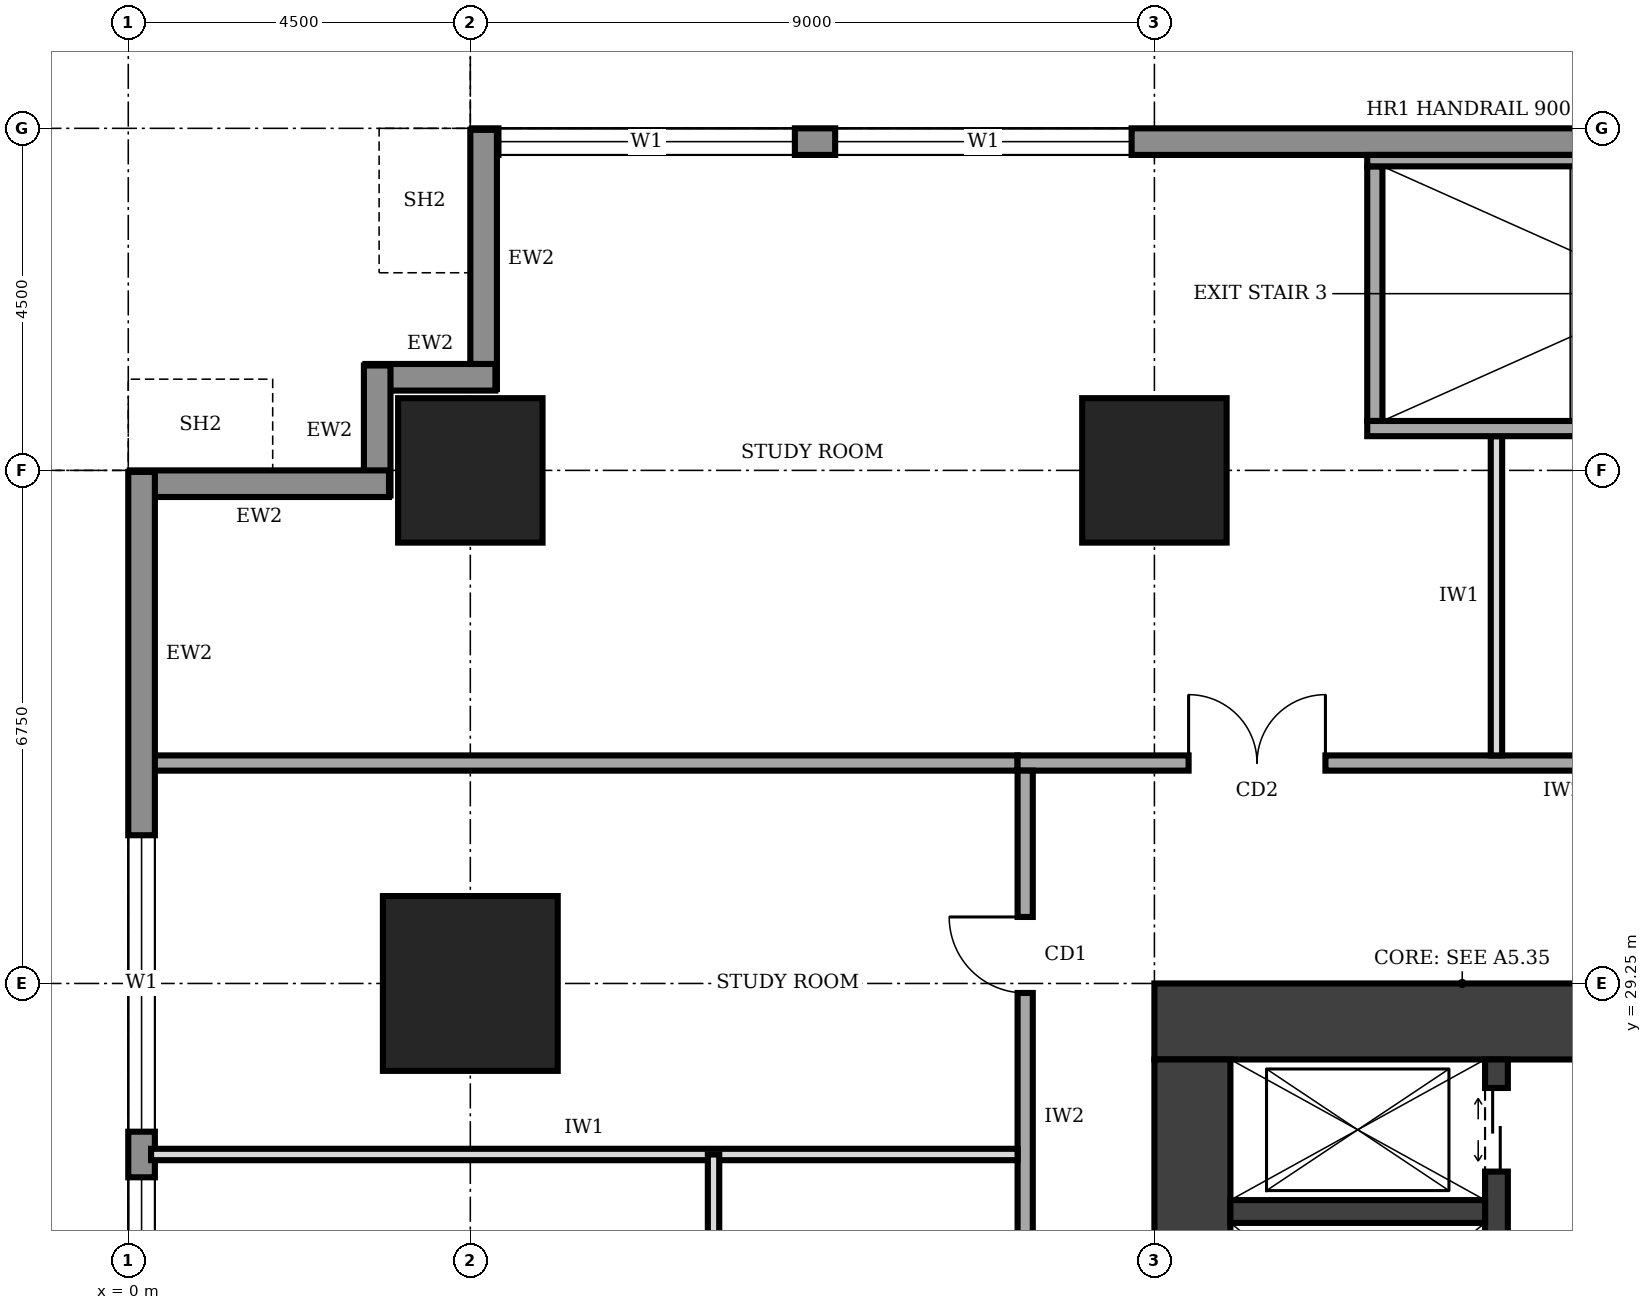
"""IFC4 building model, lengths in metres.
Left out: names, types, materials, properties, quantities, classifications, styles, units other than length and angle.
Written with IfcOpenShell. Run it as: python <this file> out.ifc"""

import sys

from ifc_helpers import new_model, si_unit, direction, frame, frame_2d, origin, origin_2d, place, context, subcontext, project, spatial, rectangle, extrude, element, fill, save


model = new_model("IFC4")
c1 = context("Model", 3, precision=1e-05, world=origin(), true_north=direction((0.0, 1.0)))
c2 = subcontext(c1, "Body", "Model", "MODEL_VIEW")
j1 = project(units=[si_unit("LENGTHUNIT", "METRE"), si_unit("PLANEANGLEUNIT", "RADIAN")], contexts=[c1])
p1 = place(None, origin())
s1 = spatial("IfcSite", under=j1, at=p1, CompositionType="ELEMENT")
p2 = place(p1, origin())
s2 = spatial("IfcBuilding", under=s1, at=p2, CompositionType="ELEMENT")
p3 = place(p2, frame((0.0, 0.0, 125.0)))
s3 = spatial("IfcBuildingStorey", under=s2, at=p3, CompositionType="ELEMENT", Elevation=125.0)
p4 = place(p3, frame((27.0, 28.75, 0.0), z_axis=(0.0, 0.0, 1.0), x_axis=(-1.0, 0.0, 0.0)))
e1 = element("IfcWall", 1, at=p4, inside=s3, PredefinedType="SHEAR", context=c2, shape_type="SweptSolid", body=[
    extrude(rectangle(XDim=13.5, YDim=1.0, at=frame_2d((6.75, 0.0))), origin(), (0.0, 0.0, 1.0), 4.0),
])
p5 = place(p4, frame((4.75, 0.0, 0.0)))
e2 = element("IfcOpeningElement", 2, at=p5, cuts=e1, PredefinedType="OPENING", context=c2, shape_type="SweptSolid", body=[
    extrude(rectangle(XDim=1.8, YDim=2.1, at=frame_2d((0.9, 1.05))), frame((0.0, 0.51, 0.0), z_axis=(0.0, -1.0, 0.0), x_axis=(1.0, 0.0, 0.0)), (0.0, 0.0, 1.0), 1.02),
])
p6 = place(p3, frame((14.0, 28.25, 0.0), z_axis=(0.0, 0.0, 1.0), x_axis=(0.0, -1.0, 0.0)))
e3 = element("IfcWall", 3, at=p6, inside=s3, PredefinedType="SHEAR", context=c2, shape_type="SweptSolid", body=[
    extrude(rectangle(XDim=16.0, YDim=1.0, at=frame_2d((8.0, 0.0))), origin(), (0.0, 0.0, 1.0), 4.0),
])
p7 = place(p3, frame((18.0, 12.25, 0.0), z_axis=(0.0, 0.0, 1.0), x_axis=(0.0, 1.0, 0.0)))
e4 = element("IfcWall", 4, at=p7, inside=s3, PredefinedType="SHEAR", context=c2, shape_type="SweptSolid", body=[
    extrude(rectangle(XDim=16.0, YDim=0.3, at=frame_2d((8.0, 0.0))), origin(), (0.0, 0.0, 1.0), 4.0),
])
p8 = place(p7, frame((0.4, 0.0, 0.0)))
e5 = element("IfcOpeningElement", 5, at=p8, cuts=e4, PredefinedType="OPENING", context=c2, shape_type="SweptSolid", body=[
    extrude(rectangle(XDim=1.0, YDim=2.1, at=frame_2d((0.5, 1.05))), frame((0.0, 0.16, 0.0), z_axis=(0.0, -1.0, 0.0), x_axis=(1.0, 0.0, 0.0)), (0.0, 0.0, 1.0), 0.32),
])
p9 = place(p7, frame((14.525, 0.0, 0.0)))
e6 = element("IfcOpeningElement", 6, at=p9, cuts=e4, PredefinedType="OPENING", context=c2, shape_type="SweptSolid", body=[
    extrude(rectangle(XDim=1.1, YDim=2.1, at=frame_2d((0.55, 1.05))), frame((0.0, 0.16, 0.0), z_axis=(0.0, -1.0, 0.0), x_axis=(1.0, 0.0, 0.0)), (0.0, 0.0, 1.0), 0.32),
])
p10 = place(p7, frame((9.0, 0.0, 0.0)))
e7 = element("IfcOpeningElement", 7, at=p10, cuts=e4, PredefinedType="OPENING", context=c2, shape_type="SweptSolid", body=[
    extrude(rectangle(XDim=1.0, YDim=2.1, at=frame_2d((0.5, 1.05))), frame((0.0, 0.16, 0.0), z_axis=(0.0, -1.0, 0.0), x_axis=(1.0, 0.0, 0.0)), (0.0, 0.0, 1.0), 0.32),
])
p11 = place(p7, frame((12.0, 0.0, 0.0)))
e8 = element("IfcOpeningElement", 8, at=p11, cuts=e4, PredefinedType="OPENING", context=c2, shape_type="SweptSolid", body=[
    extrude(rectangle(XDim=1.0, YDim=2.1, at=frame_2d((0.5, 1.05))), frame((0.0, 0.16, 0.0), z_axis=(0.0, -1.0, 0.0), x_axis=(1.0, 0.0, 0.0)), (0.0, 0.0, 1.0), 0.32),
])
p12 = place(p3, frame((14.5, 26.25, 0.0), z_axis=(0.0, 0.0, 1.0), x_axis=(1.0, 0.0, 0.0)))
e9 = element("IfcWall", 9, at=p12, inside=s3, PredefinedType="SHEAR", context=c2, shape_type="SweptSolid", body=[
    extrude(rectangle(XDim=3.35, YDim=0.3, at=frame_2d((1.675, 0.0))), origin(), (0.0, 0.0, 1.0), 4.0),
])
p13 = place(p3, frame((4.5, 29.25, 0.0), z_axis=(0.0, 0.0, 1.0), x_axis=(1.0, 0.0, 0.0)))
e10 = element("IfcColumn", 10, at=p13, inside=s3, PredefinedType="COLUMN", context=c2, shape_type="SweptSolid", body=[
    extrude(rectangle(XDim=2.3, YDim=2.3, at=origin_2d()), origin(), (0.0, 0.0, 1.0), 4.0),
])
for number, where, z_axis, x_axis in (
    (11, (4.5, 36.0, 0.0), (0.0, 0.0, 1.0), (1.0, 0.0, 0.0)),
    (12, (13.5, 36.0, 0.0), (0.0, 0.0, 1.0), (1.0, 0.0, 0.0)),
):
    element("IfcColumn", number, at=place(p3, frame(where, z_axis=z_axis, x_axis=x_axis)), inside=s3, PredefinedType="COLUMN", context=c2, shape_type="SweptSolid", body=[
        extrude(rectangle(XDim=1.9, YDim=1.9, at=origin_2d()), origin(), (0.0, 0.0, 1.0), 4.0),
    ])
p14 = place(p3, frame((35.98, 40.325, 0.0), z_axis=(0.0, 0.0, 1.0), x_axis=(-1.0, 0.0, 0.0)))
e13 = element("IfcWall", 13, at=p14, inside=s3, PredefinedType="STANDARD", context=c2, shape_type="SweptSolid", body=[
    extrude(rectangle(XDim=31.46, YDim=0.35, at=frame_2d((15.73, 0.0))), origin(), (0.0, 0.0, 1.0), 3.75),
])
p15 = place(p14, frame((27.21, 0.0, 0.9)))
e14 = element("IfcOpeningElement", 14, at=p15, cuts=e13, PredefinedType="OPENING", context=c2, shape_type="SweptSolid", body=[
    extrude(rectangle(XDim=3.9, YDim=2.2, at=frame_2d((1.95, 1.1))), frame((0.0, 0.185, 0.0), z_axis=(0.0, -1.0, 0.0), x_axis=(1.0, 0.0, 0.0)), (0.0, 0.0, 1.0), 0.37),
])
p16 = place(p14, frame((22.78, 0.0, 0.9)))
e15 = element("IfcOpeningElement", 15, at=p16, cuts=e13, PredefinedType="OPENING", context=c2, shape_type="SweptSolid", body=[
    extrude(rectangle(XDim=3.9, YDim=2.2, at=frame_2d((1.95, 1.1))), frame((0.0, 0.185, 0.0), z_axis=(0.0, -1.0, 0.0), x_axis=(1.0, 0.0, 0.0)), (0.0, 0.0, 1.0), 0.37),
])
p17 = place(p14, frame((4.78, 0.0, 0.9)))
e16 = element("IfcOpeningElement", 16, at=p17, cuts=e13, PredefinedType="OPENING", context=c2, shape_type="SweptSolid", body=[
    extrude(rectangle(XDim=3.9, YDim=2.2, at=frame_2d((1.95, 1.1))), frame((0.0, 0.185, 0.0), z_axis=(0.0, -1.0, 0.0), x_axis=(1.0, 0.0, 0.0)), (0.0, 0.0, 1.0), 0.37),
])
p18 = place(p3, frame((4.675, 40.48, 0.0), z_axis=(0.0, 0.0, 1.0), x_axis=(0.0, -1.0, 0.0)))
e17 = element("IfcWall", 17, at=p18, inside=s3, PredefinedType="STANDARD", context=c2, shape_type="SweptSolid", body=[
    extrude(rectangle(XDim=3.41, YDim=0.35, at=frame_2d((1.705, 0.0))), origin(), (0.0, 0.0, 1.0), 2.85),
])
for number, where, z_axis, x_axis in (
    (18, (4.83, 37.225, 0.0), (0.0, 0.0, 1.0), (-1.0, 0.0, 0.0)),
    (19, (3.275, 37.38, 0.0), (0.0, 0.0, 1.0), (0.0, -1.0, 0.0)),
):
    element("IfcWall", number, at=place(p3, frame(where, z_axis=z_axis, x_axis=x_axis)), inside=s3, PredefinedType="STANDARD", context=c2, shape_type="SweptSolid", body=[
        extrude(rectangle(XDim=1.71, YDim=0.35, at=frame_2d((0.855, 0.0))), origin(), (0.0, 0.0, 1.0), 3.75),
    ])
p19 = place(p3, frame((3.43, 35.825, 0.0), z_axis=(0.0, 0.0, 1.0), x_axis=(-1.0, 0.0, 0.0)))
e20 = element("IfcWall", 20, at=p19, inside=s3, PredefinedType="STANDARD", context=c2, shape_type="SweptSolid", body=[
    extrude(rectangle(XDim=3.41, YDim=0.35, at=frame_2d((1.705, 0.0))), origin(), (0.0, 0.0, 1.0), 2.85),
])
p20 = place(p3, frame((0.175, 35.98, 0.0), z_axis=(0.0, 0.0, 1.0), x_axis=(0.0, -1.0, 0.0)))
e21 = element("IfcWall", 21, at=p20, inside=s3, PredefinedType="STANDARD", context=c2, shape_type="SweptSolid", body=[
    extrude(rectangle(XDim=31.46, YDim=0.35, at=frame_2d((15.73, 0.0))), origin(), (0.0, 0.0, 1.0), 3.75),
])
p21 = place(p20, frame((27.21, 0.0, 0.9)))
e22 = element("IfcOpeningElement", 22, at=p21, cuts=e21, PredefinedType="OPENING", context=c2, shape_type="SweptSolid", body=[
    extrude(rectangle(XDim=3.9, YDim=2.2, at=frame_2d((1.95, 1.1))), frame((0.0, 0.185, 0.0), z_axis=(0.0, -1.0, 0.0), x_axis=(1.0, 0.0, 0.0)), (0.0, 0.0, 1.0), 0.37),
])
p22 = place(p20, frame((22.78, 0.0, 0.9)))
e23 = element("IfcOpeningElement", 23, at=p22, cuts=e21, PredefinedType="OPENING", context=c2, shape_type="SweptSolid", body=[
    extrude(rectangle(XDim=3.9, YDim=2.2, at=frame_2d((1.95, 1.1))), frame((0.0, 0.185, 0.0), z_axis=(0.0, -1.0, 0.0), x_axis=(1.0, 0.0, 0.0)), (0.0, 0.0, 1.0), 0.37),
])
p23 = place(p20, frame((18.28, 0.0, 0.9)))
e24 = element("IfcOpeningElement", 24, at=p23, cuts=e21, PredefinedType="OPENING", context=c2, shape_type="SweptSolid", body=[
    extrude(rectangle(XDim=3.9, YDim=2.2, at=frame_2d((1.95, 1.1))), frame((0.0, 0.185, 0.0), z_axis=(0.0, -1.0, 0.0), x_axis=(1.0, 0.0, 0.0)), (0.0, 0.0, 1.0), 0.37),
])
p24 = place(p20, frame((13.78, 0.0, 0.9)))
e25 = element("IfcOpeningElement", 25, at=p24, cuts=e21, PredefinedType="OPENING", context=c2, shape_type="SweptSolid", body=[
    extrude(rectangle(XDim=3.9, YDim=2.2, at=frame_2d((1.95, 1.1))), frame((0.0, 0.185, 0.0), z_axis=(0.0, -1.0, 0.0), x_axis=(1.0, 0.0, 0.0)), (0.0, 0.0, 1.0), 0.37),
])
p25 = place(p20, frame((9.28, 0.0, 0.9)))
e26 = element("IfcOpeningElement", 26, at=p25, cuts=e21, PredefinedType="OPENING", context=c2, shape_type="SweptSolid", body=[
    extrude(rectangle(XDim=3.9, YDim=2.2, at=frame_2d((1.95, 1.1))), frame((0.0, 0.185, 0.0), z_axis=(0.0, -1.0, 0.0), x_axis=(1.0, 0.0, 0.0)), (0.0, 0.0, 1.0), 0.37),
])
p26 = place(p20, frame((4.78, 0.0, 0.9)))
e27 = element("IfcOpeningElement", 27, at=p26, cuts=e21, PredefinedType="OPENING", context=c2, shape_type="SweptSolid", body=[
    extrude(rectangle(XDim=3.9, YDim=2.2, at=frame_2d((1.95, 1.1))), frame((0.0, 0.185, 0.0), z_axis=(0.0, -1.0, 0.0), x_axis=(1.0, 0.0, 0.0)), (0.0, 0.0, 1.0), 0.37),
])
p27 = place(p3, frame((29.35, 32.15, 0.0), z_axis=(0.0, 0.0, 1.0), x_axis=(-1.0, 0.0, 0.0)))
e28 = element("IfcWall", 28, at=p27, inside=s3, PredefinedType="SOLIDWALL", context=c2, shape_type="SweptSolid", body=[
    extrude(rectangle(XDim=17.65, YDim=0.2, at=frame_2d((8.825, 0.0))), origin(), (0.0, 0.0, 1.0), 3.75),
])
p28 = place(p27, frame((13.6, 0.0, 0.0)))
e29 = element("IfcOpeningElement", 29, at=p28, cuts=e28, PredefinedType="OPENING", context=c2, shape_type="SweptSolid", body=[
    extrude(rectangle(XDim=1.8, YDim=2.1, at=frame_2d((0.9, 1.05))), frame((0.0, 0.11, 0.0), z_axis=(0.0, -1.0, 0.0), x_axis=(1.0, 0.0, 0.0)), (0.0, 0.0, 1.0), 0.22),
])
p29 = place(p27, frame((6.35, 0.0, 0.0)))
e30 = element("IfcOpeningElement", 30, at=p29, cuts=e28, PredefinedType="OPENING", context=c2, shape_type="SweptSolid", body=[
    extrude(rectangle(XDim=1.0, YDim=2.1, at=frame_2d((0.5, 1.05))), frame((0.0, 0.11, 0.0), z_axis=(0.0, -1.0, 0.0), x_axis=(1.0, 0.0, 0.0)), (0.0, 0.0, 1.0), 0.22),
])
p30 = place(p27, frame((0.575, 0.0, 0.0)))
e31 = element("IfcOpeningElement", 31, at=p30, cuts=e28, PredefinedType="OPENING", context=c2, shape_type="SweptSolid", body=[
    extrude(rectangle(XDim=1.0, YDim=2.1, at=frame_2d((0.5, 1.05))), frame((0.0, 0.11, 0.0), z_axis=(0.0, -1.0, 0.0), x_axis=(1.0, 0.0, 0.0)), (0.0, 0.0, 1.0), 0.22),
])
p31 = place(p3, frame((11.8, 32.05, 0.0), z_axis=(0.0, 0.0, 1.0), x_axis=(0.0, -1.0, 0.0)))
e32 = element("IfcWall", 32, at=p31, inside=s3, PredefinedType="SOLIDWALL", context=c2, shape_type="SweptSolid", body=[
    extrude(rectangle(XDim=23.05, YDim=0.2, at=frame_2d((11.525, 0.0))), origin(), (0.0, 0.0, 1.0), 3.75),
])
p32 = place(p31, frame((20.3, 0.0, 0.0)))
e33 = element("IfcOpeningElement", 33, at=p32, cuts=e32, PredefinedType="OPENING", context=c2, shape_type="SweptSolid", body=[
    extrude(rectangle(XDim=1.0, YDim=2.1, at=frame_2d((0.5, 1.05))), frame((0.0, 0.11, 0.0), z_axis=(0.0, -1.0, 0.0), x_axis=(1.0, 0.0, 0.0)), (0.0, 0.0, 1.0), 0.22),
])
p33 = place(p31, frame((16.95, 0.0, 0.0)))
e34 = element("IfcOpeningElement", 34, at=p33, cuts=e32, PredefinedType="OPENING", context=c2, shape_type="SweptSolid", body=[
    extrude(rectangle(XDim=1.0, YDim=2.1, at=frame_2d((0.5, 1.05))), frame((0.0, 0.11, 0.0), z_axis=(0.0, -1.0, 0.0), x_axis=(1.0, 0.0, 0.0)), (0.0, 0.0, 1.0), 0.22),
])
p34 = place(p31, frame((13.95, 0.0, 0.0)))
e35 = element("IfcOpeningElement", 35, at=p34, cuts=e32, PredefinedType="OPENING", context=c2, shape_type="SweptSolid", body=[
    extrude(rectangle(XDim=0.9, YDim=2.1, at=frame_2d((0.45, 1.05))), frame((0.0, 0.11, 0.0), z_axis=(0.0, -1.0, 0.0), x_axis=(1.0, 0.0, 0.0)), (0.0, 0.0, 1.0), 0.22),
])
p35 = place(p31, frame((10.9, 0.0, 0.0)))
e36 = element("IfcOpeningElement", 36, at=p35, cuts=e32, PredefinedType="OPENING", context=c2, shape_type="SweptSolid", body=[
    extrude(rectangle(XDim=0.9, YDim=2.1, at=frame_2d((0.45, 1.05))), frame((0.0, 0.11, 0.0), z_axis=(0.0, -1.0, 0.0), x_axis=(1.0, 0.0, 0.0)), (0.0, 0.0, 1.0), 0.22),
])
p36 = place(p31, frame((6.2, 0.0, 0.0)))
e37 = element("IfcOpeningElement", 37, at=p36, cuts=e32, PredefinedType="OPENING", context=c2, shape_type="SweptSolid", body=[
    extrude(rectangle(XDim=0.9, YDim=2.1, at=frame_2d((0.45, 1.05))), frame((0.0, 0.11, 0.0), z_axis=(0.0, -1.0, 0.0), x_axis=(1.0, 0.0, 0.0)), (0.0, 0.0, 1.0), 0.22),
])
p37 = place(p31, frame((8.75, 0.0, 0.0)))
e38 = element("IfcOpeningElement", 38, at=p37, cuts=e32, PredefinedType="OPENING", context=c2, shape_type="SweptSolid", body=[
    extrude(rectangle(XDim=1.0, YDim=2.1, at=frame_2d((0.5, 1.05))), frame((0.0, 0.11, 0.0), z_axis=(0.0, -1.0, 0.0), x_axis=(1.0, 0.0, 0.0)), (0.0, 0.0, 1.0), 0.22),
])
p38 = place(p31, frame((1.925, 0.0, 0.0)))
e39 = element("IfcOpeningElement", 39, at=p38, cuts=e32, PredefinedType="OPENING", context=c2, shape_type="SweptSolid", body=[
    extrude(rectangle(XDim=1.0, YDim=2.1, at=frame_2d((0.5, 1.05))), frame((0.0, 0.11, 0.0), z_axis=(0.0, -1.0, 0.0), x_axis=(1.0, 0.0, 0.0)), (0.0, 0.0, 1.0), 0.22),
])
p39 = place(p3, frame((0.3, 32.15, 0.0), z_axis=(0.0, 0.0, 1.0), x_axis=(1.0, 0.0, 0.0)))
e40 = element("IfcWall", 40, at=p39, inside=s3, PredefinedType="SOLIDWALL", context=c2, shape_type="SweptSolid", body=[
    extrude(rectangle(XDim=11.4, YDim=0.2, at=frame_2d((5.7, 0.0))), origin(), (0.0, 0.0, 1.0), 3.75),
])
p40 = place(p3, frame((18.0, 32.25, 0.0), z_axis=(0.0, 0.0, 1.0), x_axis=(0.0, 1.0, 0.0)))
e41 = element("IfcWall", 41, at=p40, inside=s3, PredefinedType="PARTITIONING", context=c2, shape_type="SweptSolid", body=[
    extrude(rectangle(XDim=4.2, YDim=0.15, at=frame_2d((2.1, 0.0))), origin(), (0.0, 0.0, 1.0), 3.75),
])
p41 = place(p3, frame((0.3, 27.0, 0.0), z_axis=(0.0, 0.0, 1.0), x_axis=(1.0, 0.0, 0.0)))
e42 = element("IfcWall", 42, at=p41, inside=s3, PredefinedType="PARTITIONING", context=c2, shape_type="SweptSolid", body=[
    extrude(rectangle(XDim=11.4, YDim=0.15, at=frame_2d((5.7, 0.0))), origin(), (0.0, 0.0, 1.0), 3.75),
])
p42 = place(p3, frame((7.7, 23.8, 0.0), z_axis=(0.0, 0.0, 1.0), x_axis=(0.0, 1.0, 0.0)))
e43 = element("IfcWall", 43, at=p42, inside=s3, PredefinedType="PARTITIONING", context=c2, shape_type="SweptSolid", body=[
    extrude(rectangle(XDim=3.2, YDim=0.15, at=frame_2d((1.6, 0.0))), origin(), (0.0, 0.0, 1.0), 3.75),
])
p43 = place(p3, frame((16.3, 36.55, 0.0), z_axis=(0.0, 0.0, 1.0), x_axis=(1.0, 0.0, 0.0)))
e44 = element("IfcWall", 44, at=p43, inside=s3, PredefinedType="SOLIDWALL", context=c2, shape_type="SweptSolid", body=[
    extrude(rectangle(XDim=7.9, YDim=0.2, at=frame_2d((3.95, 0.0))), origin(), (0.0, 0.0, 1.0), 3.75),
])
p44 = place(p43, frame((6.3, 0.0, 0.0)))
e45 = element("IfcOpeningElement", 45, at=p44, cuts=e44, PredefinedType="OPENING", context=c2, shape_type="SweptSolid", body=[
    extrude(rectangle(XDim=1.0, YDim=2.1, at=frame_2d((0.5, 1.05))), frame((0.0, 0.11, 0.0), z_axis=(0.0, -1.0, 0.0), x_axis=(1.0, 0.0, 0.0)), (0.0, 0.0, 1.0), 0.22),
])
p45 = place(p3, frame((16.3, 40.075, 0.0), z_axis=(0.0, 0.0, 1.0), x_axis=(1.0, 0.0, 0.0)))
e46 = element("IfcWall", 46, at=p45, inside=s3, PredefinedType="SOLIDWALL", context=c2, shape_type="SweptSolid", body=[
    extrude(rectangle(XDim=7.9, YDim=0.15, at=frame_2d((3.95, 0.0))), origin(), (0.0, 0.0, 1.0), 3.75),
])
p46 = place(p3, frame((16.4, 36.65, 0.0), z_axis=(0.0, 0.0, 1.0), x_axis=(0.0, 1.0, 0.0)))
e47 = element("IfcWall", 47, at=p46, inside=s3, PredefinedType="SOLIDWALL", context=c2, shape_type="SweptSolid", body=[
    extrude(rectangle(XDim=3.35, YDim=0.2, at=frame_2d((1.675, 0.0))), origin(), (0.0, 0.0, 1.0), 3.75),
])
p47 = place(p15, origin())
e48 = element("IfcWindow", 48, at=p47, inside=s3, PartitioningType="SINGLE_PANEL", PredefinedType="WINDOW", context=c2, shape_type="SweptSolid", body=[
    extrude(rectangle(XDim=3.9, YDim=2.2, at=frame_2d((1.95, 1.1))), frame((0.0, 0.03, 0.0), z_axis=(0.0, -1.0, 0.0), x_axis=(1.0, 0.0, 0.0)), (0.0, 0.0, 1.0), 0.06),
])
fill(e14, e48)
p48 = place(p16, origin())
e49 = element("IfcWindow", 49, at=p48, inside=s3, PartitioningType="SINGLE_PANEL", PredefinedType="WINDOW", context=c2, shape_type="SweptSolid", body=[
    extrude(rectangle(XDim=3.9, YDim=2.2, at=frame_2d((1.95, 1.1))), frame((0.0, 0.03, 0.0), z_axis=(0.0, -1.0, 0.0), x_axis=(1.0, 0.0, 0.0)), (0.0, 0.0, 1.0), 0.06),
])
fill(e15, e49)
p49 = place(p25, origin())
e50 = element("IfcWindow", 50, at=p49, inside=s3, PartitioningType="SINGLE_PANEL", PredefinedType="WINDOW", context=c2, shape_type="SweptSolid", body=[
    extrude(rectangle(XDim=3.9, YDim=2.2, at=frame_2d((1.95, 1.1))), frame((0.0, 0.03, 0.0), z_axis=(0.0, -1.0, 0.0), x_axis=(1.0, 0.0, 0.0)), (0.0, 0.0, 1.0), 0.06),
])
fill(e26, e50)
p50 = place(p26, origin())
e51 = element("IfcWindow", 51, at=p50, inside=s3, PartitioningType="SINGLE_PANEL", PredefinedType="WINDOW", context=c2, shape_type="SweptSolid", body=[
    extrude(rectangle(XDim=3.9, YDim=2.2, at=frame_2d((1.95, 1.1))), frame((0.0, 0.03, 0.0), z_axis=(0.0, -1.0, 0.0), x_axis=(1.0, 0.0, 0.0)), (0.0, 0.0, 1.0), 0.06),
])
fill(e27, e51)
p51 = place(p9, origin())
e52 = element("IfcDoor", 52, at=p51, inside=s3, OperationType="DOUBLE_DOOR_SLIDING", PredefinedType="DOOR", context=c2, shape_type="SweptSolid", body=[
    extrude(rectangle(XDim=1.1, YDim=2.1, at=frame_2d((0.55, 1.05))), frame((0.0, 0.025, 0.0), z_axis=(0.0, -1.0, 0.0), x_axis=(1.0, 0.0, 0.0)), (0.0, 0.0, 1.0), 0.05),
])
fill(e6, e52)
p52 = place(p28, frame((1.8, 0.0, 0.0), z_axis=(0.0, 0.0, 1.0), x_axis=(-1.0, 0.0, 0.0)))
e53 = element("IfcDoor", 53, at=p52, inside=s3, OperationType="DOUBLE_DOOR_SINGLE_SWING", PredefinedType="DOOR", context=c2, shape_type="SweptSolid", body=[
    extrude(rectangle(XDim=1.8, YDim=2.1, at=frame_2d((0.9, 1.05))), frame((0.0, 0.025, 0.0), z_axis=(0.0, -1.0, 0.0), x_axis=(1.0, 0.0, 0.0)), (0.0, 0.0, 1.0), 0.05),
])
fill(e29, e53)
p53 = place(p38, frame((1.0, 0.0, 0.0), z_axis=(0.0, 0.0, 1.0), x_axis=(-1.0, 0.0, 0.0)))
e54 = element("IfcDoor", 54, at=p53, inside=s3, OperationType="SINGLE_SWING_RIGHT", PredefinedType="DOOR", context=c2, shape_type="SweptSolid", body=[
    extrude(rectangle(XDim=1.0, YDim=2.1, at=frame_2d((0.5, 1.05))), frame((0.0, 0.025, 0.0), z_axis=(0.0, -1.0, 0.0), x_axis=(1.0, 0.0, 0.0)), (0.0, 0.0, 1.0), 0.05),
])
fill(e39, e54)
save(model, sys.argv[1])
